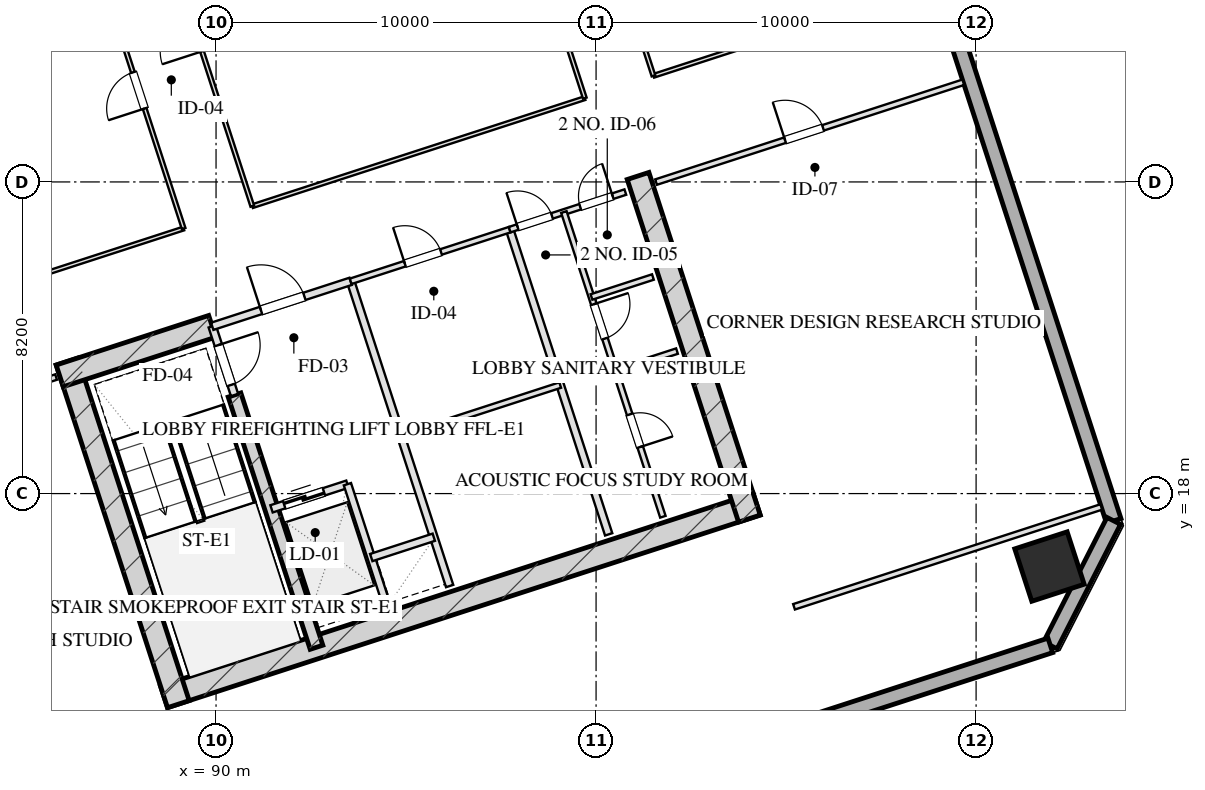
"""IFC4 building model, lengths in metres.
Left out: names, types, materials, properties, quantities, classifications, styles, units other than length and angle.
Written with IfcOpenShell. Run it as: python <this file> out.ifc"""

import sys

from ifc_helpers import new_model, si_unit, direction, frame, frame_2d, origin, origin_2d, place, context, subcontext, project, spatial, rectangle, hollow_rectangle, extrude, element, fill, save


model = new_model("IFC4")
c1 = context("Model", 3, precision=1e-05, world=origin(), true_north=direction((0.0, 1.0)))
c2 = subcontext(c1, "Body", "Model", "MODEL_VIEW")
j1 = project(units=[si_unit("LENGTHUNIT", "METRE"), si_unit("PLANEANGLEUNIT", "RADIAN")], contexts=[c1])
p1 = place(None, origin())
s1 = spatial("IfcSite", under=j1, at=p1, CompositionType="ELEMENT")
p2 = place(p1, origin())
s2 = spatial("IfcBuilding", under=s1, at=p2, CompositionType="ELEMENT")
p3 = place(p2, frame((0.0, 0.0, 127.65)))
s3 = spatial("IfcBuildingStorey", under=s2, at=p3, CompositionType="ELEMENT", Elevation=127.65)
p4 = place(p3, frame((88.63, 12.652, 0.0), z_axis=(0.0, 0.0, 1.0), x_axis=(0.95105714907, 0.309015046886, 0.0)))
e1 = element("IfcWall", 1, at=p4, inside=s3, PredefinedType="SHEAR", context=c2, shape_type="SweptSolid", body=[
    extrude(rectangle(XDim=16.4, YDim=0.6, at=frame_2d((8.2, 0.0))), origin(), (0.0, 0.0, 1.0), 3.45),
])
p5 = place(p3, frame((86.078, 21.475, 0.0), z_axis=(0.0, 0.0, 1.0), x_axis=(0.309017938678, -0.951056209472, 0.0)))
e2 = element("IfcWall", 2, at=p5, inside=s3, PredefinedType="SHEAR", context=c2, shape_type="SweptSolid", body=[
    extrude(rectangle(XDim=9.48, YDim=0.6, at=frame_2d((4.74, 0.0))), origin(), (0.0, 0.0, 1.0), 3.45),
])
p6 = place(p3, frame((101.105, 26.358, 0.0), z_axis=(0.0, 0.0, 1.0), x_axis=(0.309010370028, -0.95105866865, 0.0)))
e3 = element("IfcWall", 3, at=p6, inside=s3, PredefinedType="SHEAR", context=c2, shape_type="SweptSolid", body=[
    extrude(rectangle(XDim=9.48, YDim=0.6, at=frame_2d((4.74, 0.0))), origin(), (0.0, 0.0, 1.0), 3.45),
])
p7 = place(p3, frame((90.486, 20.594, 0.0), z_axis=(0.0, 0.0, 1.0), x_axis=(0.309020428229, -0.951055400562, 0.0)))
e4 = element("IfcWall", 4, at=p7, inside=s3, PredefinedType="SHEAR", context=c2, shape_type="SweptSolid", body=[
    extrude(rectangle(XDim=6.98, YDim=0.35, at=frame_2d((3.49, 0.0))), origin(), (0.0, 0.0, 1.0), 3.45),
])
p8 = place(p3, frame((85.886, 21.097, 0.0), z_axis=(0.0, 0.0, 1.0), x_axis=(0.951068073652, 0.308981422225, 0.0)))
e5 = element("IfcWall", 5, at=p8, inside=s3, PredefinedType="SHEAR", context=c2, shape_type="SweptSolid", body=[
    extrude(rectangle(XDim=4.22, YDim=0.6, at=frame_2d((2.11, 0.0))), origin(), (0.0, 0.0, 1.0), 3.45),
])
p9 = place(p3, frame((111.931, 16.08, 0.0), z_axis=(0.0, 0.0, 1.0), x_axis=(0.951056516295, 0.309016994375, 0.0)))
e6 = element("IfcColumn", 6, at=p9, inside=s3, PredefinedType="COLUMN", context=c2, shape_type="SweptSolid", body=[
    extrude(hollow_rectangle(XDim=1.45, YDim=1.45, WallThickness=0.05, at=origin_2d()), origin(), (0.0, 0.0, 1.0), 3.451),
])
p10 = place(p3, frame((99.284, 61.41, 0.0), z_axis=(0.0, 0.0, 1.0), x_axis=(0.309017542002, -0.95105633836, 0.0)))
e7 = element("IfcWall", 7, at=p10, inside=s3, PredefinedType="SOLIDWALL", context=c2, shape_type="SweptSolid", body=[
    extrude(rectangle(XDim=46.4, YDim=0.4, at=frame_2d((23.2, 0.0))), origin(), (0.0, 0.0, 1.0), 2.61),
])
p11 = place(p3, frame((113.623, 17.281, 0.0), z_axis=(0.0, 0.0, 1.0), x_axis=(-0.454026238093, -0.890988313685, 0.0)))
e8 = element("IfcWall", 8, at=p11, inside=s3, PredefinedType="SOLIDWALL", context=c2, shape_type="SweptSolid", body=[
    extrude(rectangle(XDim=3.677, YDim=0.4, at=frame_2d((1.838, 0.0))), origin(), (0.0, 0.0, 1.0), 2.61),
])
p12 = place(p3, frame((111.953, 14.005, 0.0), z_axis=(0.0, 0.0, 1.0), x_axis=(-0.95105505922, -0.309021478754, 0.0)))
e9 = element("IfcWall", 9, at=p12, inside=s3, PredefinedType="SOLIDWALL", context=c2, shape_type="SweptSolid", body=[
    extrude(rectangle(XDim=29.4, YDim=0.4, at=frame_2d((14.7, 0.0))), origin(), (0.0, 0.0, 1.0), 2.61),
])
p13 = place(p3, frame((89.899, 22.401, 0.0), z_axis=(0.0, 0.0, 1.0), x_axis=(0.308932062672, -0.951084108086, 0.0)))
e10 = element("IfcWall", 10, at=p13, inside=s3, PredefinedType="PARTITIONING", context=c2, shape_type="SweptSolid", body=[
    extrude(rectangle(XDim=1.9, YDim=0.2, at=frame_2d((0.95, 0.0))), origin(), (0.0, 0.0, 1.0), 3.175),
])
p14 = place(p13, frame((0.52, 0.0, 0.0)))
e11 = element("IfcOpeningElement", 11, at=p14, cuts=e10, PredefinedType="OPENING", context=c2, shape_type="SweptSolid", body=[
    extrude(rectangle(XDim=1.1, YDim=2.05, at=frame_2d((0.55, 1.025))), frame((0.0, 0.11, 0.0), z_axis=(0.0, -1.0, 0.0), x_axis=(1.0, 0.0, 0.0)), (0.0, 0.0, 1.0), 0.22),
])
p15 = place(p3, frame((93.542, 23.585, 0.0), z_axis=(0.0, 0.0, 1.0), x_axis=(0.309042196757, -0.951048327176, 0.0)))
e12 = element("IfcWall", 12, at=p15, inside=s3, PredefinedType="PARTITIONING", context=c2, shape_type="SweptSolid", body=[
    extrude(rectangle(XDim=8.43, YDim=0.2, at=frame_2d((4.215, 0.0))), origin(), (0.0, 0.0, 1.0), 3.175),
])
p16 = place(p3, frame((89.899, 22.401, 0.0), z_axis=(0.0, 0.0, 1.0), x_axis=(0.951046716504, 0.309047153403, 0.0)))
e13 = element("IfcWall", 13, at=p16, inside=s3, PredefinedType="PARTITIONING", context=c2, shape_type="SweptSolid", body=[
    extrude(rectangle(XDim=3.83, YDim=0.2, at=frame_2d((1.915, 0.0))), origin(), (0.0, 0.0, 1.0), 3.175),
])
p17 = place(p16, frame((1.35, 0.0, 0.0)))
e14 = element("IfcOpeningElement", 14, at=p17, cuts=e13, PredefinedType="OPENING", context=c2, shape_type="SweptSolid", body=[
    extrude(rectangle(XDim=1.2, YDim=2.05, at=frame_2d((0.6, 1.025))), frame((0.0, 0.11, 0.0), z_axis=(0.0, -1.0, 0.0), x_axis=(1.0, 0.0, 0.0)), (0.0, 0.0, 1.0), 0.22),
])
p18 = place(p3, frame((91.46, 17.598, 0.0), z_axis=(0.0, 0.0, 1.0), x_axis=(0.951062257173, 0.308999325213, 0.0)))
e15 = element("IfcWall", 15, at=p18, inside=s3, PredefinedType="PARTITIONING", context=c2, shape_type="SweptSolid", body=[
    extrude(rectangle(XDim=2.1, YDim=0.2, at=frame_2d((1.05, 0.0))), origin(), (0.0, 0.0, 1.0), 3.175),
])
p19 = place(p18, frame((0.35, 0.0, 0.0)))
e16 = element("IfcOpeningElement", 16, at=p19, cuts=e15, PredefinedType="OPENING", context=c2, shape_type="SweptSolid", body=[
    extrude(rectangle(XDim=1.1, YDim=2.05, at=frame_2d((0.55, 1.025))), frame((0.0, 0.11, 0.0), z_axis=(0.0, -1.0, 0.0), x_axis=(1.0, 0.0, 0.0)), (0.0, 0.0, 1.0), 0.22),
])
p20 = place(p3, frame((93.457, 18.247, 0.0), z_axis=(0.0, 0.0, 1.0), x_axis=(0.3089935693, -0.951064127245, 0.0)))
e17 = element("IfcWall", 17, at=p20, inside=s3, PredefinedType="PARTITIONING", context=c2, shape_type="SweptSolid", body=[
    extrude(rectangle(XDim=3.7, YDim=0.2, at=frame_2d((1.85, 0.0))), origin(), (0.0, 0.0, 1.0), 3.175),
])
p21 = place(p3, frame((94.084, 16.317, 0.0), z_axis=(0.0, 0.0, 1.0), x_axis=(0.951041328149, 0.309063734775, 0.0)))
e18 = element("IfcWall", 18, at=p21, inside=s3, PredefinedType="PARTITIONING", context=c2, shape_type="SweptSolid", body=[
    extrude(rectangle(XDim=1.73, YDim=0.2, at=frame_2d((0.865, 0.0))), origin(), (0.0, 0.0, 1.0), 3.175),
])
p22 = place(p3, frame((97.727, 24.944, 0.0), z_axis=(0.0, 0.0, 1.0), x_axis=(0.309016001439, -0.951056838919, 0.0)))
e19 = element("IfcWall", 19, at=p22, inside=s3, PredefinedType="PARTITIONING", context=c2, shape_type="SweptSolid", body=[
    extrude(rectangle(XDim=8.43, YDim=0.2, at=frame_2d((4.215, 0.0))), origin(), (0.0, 0.0, 1.0), 3.175),
])
p23 = place(p3, frame((93.542, 23.585, 0.0), z_axis=(0.0, 0.0, 1.0), x_axis=(0.951063829732, 0.308994485023, 0.0)))
e20 = element("IfcWall", 20, at=p23, inside=s3, PredefinedType="PARTITIONING", context=c2, shape_type="SweptSolid", body=[
    extrude(rectangle(XDim=4.4, YDim=0.15, at=frame_2d((2.2, 0.0))), origin(), (0.0, 0.0, 1.0), 3.175),
])
p24 = place(p23, frame((1.5, 0.0, 0.0)))
e21 = element("IfcOpeningElement", 21, at=p24, cuts=e20, PredefinedType="OPENING", context=c2, shape_type="SweptSolid", body=[
    extrude(rectangle(XDim=1.0, YDim=2.05, at=frame_2d((0.5, 1.025))), frame((0.0, 0.085, 0.0), z_axis=(0.0, -1.0, 0.0), x_axis=(1.0, 0.0, 0.0)), (0.0, 0.0, 1.0), 0.17),
])
p25 = place(p3, frame((94.871, 19.495, 0.0), z_axis=(0.0, 0.0, 1.0), x_axis=(0.951042223598, 0.309060979314, 0.0)))
e22 = element("IfcWall", 22, at=p25, inside=s3, PredefinedType="PARTITIONING", context=c2, shape_type="SweptSolid", body=[
    extrude(rectangle(XDim=4.4, YDim=0.15, at=frame_2d((2.2, 0.0))), origin(), (0.0, 0.0, 1.0), 3.175),
])
p26 = place(p3, frame((97.727, 24.944, 0.0), z_axis=(0.0, 0.0, 1.0), x_axis=(0.951036872128, 0.309077446369, 0.0)))
e23 = element("IfcWall", 23, at=p26, inside=s3, PredefinedType="PARTITIONING", context=c2, shape_type="SweptSolid", body=[
    extrude(rectangle(XDim=3.2, YDim=0.15, at=frame_2d((1.6, 0.0))), origin(), (0.0, 0.0, 1.0), 3.175),
])
p27 = place(p26, frame((0.22, 0.0, 0.0)))
e24 = element("IfcOpeningElement", 24, at=p27, cuts=e23, PredefinedType="OPENING", context=c2, shape_type="SweptSolid", body=[
    extrude(rectangle(XDim=0.95, YDim=2.05, at=frame_2d((0.475, 1.025))), frame((0.0, 0.085, 0.0), z_axis=(0.0, -1.0, 0.0), x_axis=(1.0, 0.0, 0.0)), (0.0, 0.0, 1.0), 0.17),
])
p28 = place(p26, frame((1.95, 0.0, 0.0)))
e25 = element("IfcOpeningElement", 25, at=p28, cuts=e23, PredefinedType="OPENING", context=c2, shape_type="SweptSolid", body=[
    extrude(rectangle(XDim=0.9, YDim=2.05, at=frame_2d((0.45, 1.025))), frame((0.0, 0.085, 0.0), z_axis=(0.0, -1.0, 0.0), x_axis=(1.0, 0.0, 0.0)), (0.0, 0.0, 1.0), 0.17),
])
p29 = place(p3, frame((99.153, 25.408, 0.0), z_axis=(0.0, 0.0, 1.0), x_axis=(0.309016001439, -0.951056838919, 0.0)))
e26 = element("IfcWall", 26, at=p29, inside=s3, PredefinedType="PARTITIONING", context=c2, shape_type="SweptSolid", body=[
    extrude(rectangle(XDim=8.43, YDim=0.15, at=frame_2d((4.215, 0.0))), origin(), (0.0, 0.0, 1.0), 3.175),
])
p30 = place(p29, frame((2.55, 0.0, 0.0)))
e27 = element("IfcOpeningElement", 27, at=p30, cuts=e26, PredefinedType="OPENING", context=c2, shape_type="SweptSolid", body=[
    extrude(rectangle(XDim=0.95, YDim=2.05, at=frame_2d((0.475, 1.025))), frame((0.0, 0.085, 0.0), z_axis=(0.0, -1.0, 0.0), x_axis=(1.0, 0.0, 0.0)), (0.0, 0.0, 1.0), 0.17),
])
p31 = place(p29, frame((5.6, 0.0, 0.0)))
e28 = element("IfcOpeningElement", 28, at=p31, cuts=e26, PredefinedType="OPENING", context=c2, shape_type="SweptSolid", body=[
    extrude(rectangle(XDim=0.9, YDim=2.05, at=frame_2d((0.45, 1.025))), frame((0.0, 0.085, 0.0), z_axis=(0.0, -1.0, 0.0), x_axis=(1.0, 0.0, 0.0)), (0.0, 0.0, 1.0), 0.17),
])
for number, where, z_axis, x_axis in (
    (29, (100.513, 21.223, 0.0), (0.0, 0.0, 1.0), (0.951, 0.309, 0.0)),
    (30, (99.879, 23.173, 0.0), (0.0, 0.0, 1.0), (0.951, 0.309, 0.0)),
):
    element("IfcWall", number, at=place(p3, frame(where, z_axis=z_axis, x_axis=x_axis)), inside=s3, PredefinedType="PARTITIONING", context=c2, shape_type="SweptSolid", body=[
        extrude(rectangle(XDim=1.7, YDim=0.15, at=frame_2d((0.85, 0.0))), origin(), (0.0, 0.0, 1.0), 3.175),
    ])
p32 = place(p3, frame((77.136, 18.254, 0.0), z_axis=(0.0, 0.0, 1.0), x_axis=(0.951057133767, 0.309015093986, 0.0)))
e31 = element("IfcWall", 31, at=p32, inside=s3, PredefinedType="PARTITIONING", context=c2, shape_type="SweptSolid", body=[
    extrude(rectangle(XDim=9.1, YDim=0.15, at=frame_2d((4.55, 0.0))), origin(), (0.0, 0.0, 1.0), 3.175),
])
p33 = place(p32, frame((3.822, 0.0, 0.0)))
e32 = element("IfcOpeningElement", 32, at=p33, cuts=e31, PredefinedType="OPENING", context=c2, shape_type="SweptSolid", body=[
    extrude(rectangle(XDim=1.0, YDim=2.05, at=frame_2d((0.5, 1.025))), frame((0.0, 0.085, 0.0), z_axis=(0.0, -1.0, 0.0), x_axis=(1.0, 0.0, 0.0)), (0.0, 0.0, 1.0), 0.17),
])
p34 = place(p3, frame((105.209, 15.021, 0.0), z_axis=(0.0, 0.0, 1.0), x_axis=(0.951054329824, 0.309023723562, 0.0)))
e33 = element("IfcWall", 33, at=p34, inside=s3, PredefinedType="PARTITIONING", context=c2, shape_type="SweptSolid", body=[
    extrude(rectangle(XDim=8.5, YDim=0.15, at=frame_2d((4.25, 0.0))), origin(), (0.0, 0.0, 1.0), 3.175),
])
p35 = place(p3, frame((101.578, 26.196, 0.0), z_axis=(0.0, 0.0, 1.0), x_axis=(0.951062770994, 0.308997743729, 0.0)))
e34 = element("IfcWall", 34, at=p35, inside=s3, PredefinedType="PARTITIONING", context=c2, shape_type="SweptSolid", body=[
    extrude(rectangle(XDim=8.5, YDim=0.15, at=frame_2d((4.25, 0.0))), origin(), (0.0, 0.0, 1.0), 3.175),
])
p36 = place(p35, frame((3.57, 0.0, 0.0)))
e35 = element("IfcOpeningElement", 35, at=p36, cuts=e34, PredefinedType="OPENING", context=c2, shape_type="SweptSolid", body=[
    extrude(rectangle(XDim=1.05, YDim=2.05, at=frame_2d((0.525, 1.025))), frame((0.0, 0.085, 0.0), z_axis=(0.0, -1.0, 0.0), x_axis=(1.0, 0.0, 0.0)), (0.0, 0.0, 1.0), 0.17),
])
p37 = place(p3, frame((76.308, 20.803, 0.0), z_axis=(0.0, 0.0, 1.0), x_axis=(0.951054001411, 0.309024734286, 0.0)))
e36 = element("IfcWall", 36, at=p37, inside=s3, PredefinedType="MOVABLE", context=c2, shape_type="SweptSolid", body=[
    extrude(rectangle(XDim=13.5, YDim=0.1, at=frame_2d((6.75, 0.0))), origin(), (0.0, 0.0, 1.0), 3.175),
])
p38 = place(p3, frame((90.954, 25.562, 0.0), z_axis=(0.0, 0.0, 1.0), x_axis=(0.951052398814, 0.309029666393, 0.0)))
e37 = element("IfcWall", 37, at=p38, inside=s3, PredefinedType="MOVABLE", context=c2, shape_type="SweptSolid", body=[
    extrude(rectangle(XDim=9.2, YDim=0.1, at=frame_2d((4.6, 0.0))), origin(), (0.0, 0.0, 1.0), 3.175),
])
p39 = place(p3, frame((101.511, 28.992, 0.0), z_axis=(0.0, 0.0, 1.0), x_axis=(0.951056202154, 0.3090179612, 0.0)))
e38 = element("IfcWall", 38, at=p39, inside=s3, PredefinedType="MOVABLE", context=c2, shape_type="SweptSolid", body=[
    extrude(rectangle(XDim=7.7, YDim=0.1, at=frame_2d((3.85, 0.0))), origin(), (0.0, 0.0, 1.0), 3.175),
])
p40 = place(p3, frame((89.147, 24.975, 0.0), z_axis=(0.0, 0.0, 1.0), x_axis=(-0.309022042254, 0.951054876125, 0.0)))
e39 = element("IfcWall", 39, at=p40, inside=s3, PredefinedType="MOVABLE", context=c2, shape_type="SweptSolid", body=[
    extrude(rectangle(XDim=16.64, YDim=0.1, at=frame_2d((8.32, 0.0))), origin(), (0.0, 0.0, 1.0), 3.175),
])
p41 = place(p40, frame((3.32, 0.0, 0.0)))
e40 = element("IfcOpeningElement", 40, at=p41, cuts=e39, PredefinedType="OPENING", context=c2, shape_type="SweptSolid", body=[
    extrude(rectangle(XDim=1.0, YDim=2.05, at=frame_2d((0.5, 1.025))), frame((0.0, 0.06, 0.0), z_axis=(0.0, -1.0, 0.0), x_axis=(1.0, 0.0, 0.0)), (0.0, 0.0, 1.0), 0.12),
])
p42 = place(p40, frame((11.64, 0.0, 0.0)))
e41 = element("IfcOpeningElement", 41, at=p42, cuts=e39, PredefinedType="OPENING", context=c2, shape_type="SweptSolid", body=[
    extrude(rectangle(XDim=1.0, YDim=2.05, at=frame_2d((0.5, 1.025))), frame((0.0, 0.06, 0.0), z_axis=(0.0, -1.0, 0.0), x_axis=(1.0, 0.0, 0.0)), (0.0, 0.0, 1.0), 0.12),
])
p43 = place(p3, frame((90.954, 25.562, 0.0), z_axis=(0.0, 0.0, 1.0), x_axis=(-0.30901773025, 0.951056277195, 0.0)))
e42 = element("IfcWall", 42, at=p43, inside=s3, PredefinedType="MOVABLE", context=c2, shape_type="SweptSolid", body=[
    extrude(rectangle(XDim=16.64, YDim=0.1, at=frame_2d((8.32, 0.0))), origin(), (0.0, 0.0, 1.0), 3.175),
])
p44 = place(p43, frame((4.284, 0.0, 0.0)))
e43 = element("IfcOpeningElement", 43, at=p44, cuts=e42, PredefinedType="OPENING", context=c2, shape_type="SweptSolid", body=[
    extrude(rectangle(XDim=1.1, YDim=2.05, at=frame_2d((0.55, 1.025))), frame((0.0, 0.06, 0.0), z_axis=(0.0, -1.0, 0.0), x_axis=(1.0, 0.0, 0.0)), (0.0, 0.0, 1.0), 0.12),
])
p45 = place(p43, frame((12.724, 0.0, 0.0)))
e44 = element("IfcOpeningElement", 44, at=p45, cuts=e42, PredefinedType="OPENING", context=c2, shape_type="SweptSolid", body=[
    extrude(rectangle(XDim=1.1, YDim=2.05, at=frame_2d((0.55, 1.025))), frame((0.0, 0.06, 0.0), z_axis=(0.0, -1.0, 0.0), x_axis=(1.0, 0.0, 0.0)), (0.0, 0.0, 1.0), 0.12),
])
p46 = place(p3, frame((99.704, 28.405, 0.0), z_axis=(0.0, 0.0, 1.0), x_axis=(-0.309004459387, 0.951060589068, 0.0)))
e45 = element("IfcWall", 45, at=p46, inside=s3, PredefinedType="MOVABLE", context=c2, shape_type="SweptSolid", body=[
    extrude(rectangle(XDim=16.64, YDim=0.1, at=frame_2d((8.32, 0.0))), origin(), (0.0, 0.0, 1.0), 3.175),
])
p47 = place(p3, frame((101.511, 28.992, 0.0), z_axis=(0.0, 0.0, 1.0), x_axis=(-0.30901773025, 0.951056277195, 0.0)))
e46 = element("IfcWall", 46, at=p47, inside=s3, PredefinedType="MOVABLE", context=c2, shape_type="SweptSolid", body=[
    extrude(rectangle(XDim=16.64, YDim=0.1, at=frame_2d((8.32, 0.0))), origin(), (0.0, 0.0, 1.0), 3.175),
])
p48 = place(p47, frame((1.16, 0.0, 0.0)))
e47 = element("IfcOpeningElement", 47, at=p48, cuts=e46, PredefinedType="OPENING", context=c2, shape_type="SweptSolid", body=[
    extrude(rectangle(XDim=1.05, YDim=2.05, at=frame_2d((0.525, 1.025))), frame((0.0, 0.06, 0.0), z_axis=(0.0, -1.0, 0.0), x_axis=(1.0, 0.0, 0.0)), (0.0, 0.0, 1.0), 0.12),
])
p49 = place(p47, frame((6.16, 0.0, 0.0)))
e48 = element("IfcOpeningElement", 48, at=p49, cuts=e46, PredefinedType="OPENING", context=c2, shape_type="SweptSolid", body=[
    extrude(rectangle(XDim=1.0, YDim=2.05, at=frame_2d((0.5, 1.025))), frame((0.0, 0.06, 0.0), z_axis=(0.0, -1.0, 0.0), x_axis=(1.0, 0.0, 0.0)), (0.0, 0.0, 1.0), 0.12),
])
p50 = place(p47, frame((10.16, 0.0, 0.0)))
e49 = element("IfcOpeningElement", 49, at=p50, cuts=e46, PredefinedType="OPENING", context=c2, shape_type="SweptSolid", body=[
    extrude(rectangle(XDim=1.0, YDim=2.05, at=frame_2d((0.5, 1.025))), frame((0.0, 0.06, 0.0), z_axis=(0.0, -1.0, 0.0), x_axis=(1.0, 0.0, 0.0)), (0.0, 0.0, 1.0), 0.12),
])
p51 = place(p47, frame((14.48, 0.0, 0.0)))
e50 = element("IfcOpeningElement", 50, at=p51, cuts=e46, PredefinedType="OPENING", context=c2, shape_type="SweptSolid", body=[
    extrude(rectangle(XDim=1.0, YDim=2.05, at=frame_2d((0.5, 1.025))), frame((0.0, 0.06, 0.0), z_axis=(0.0, -1.0, 0.0), x_axis=(1.0, 0.0, 0.0)), (0.0, 0.0, 1.0), 0.12),
])
p52 = place(p3, frame((73.947, 28.069, 0.0), z_axis=(0.0, 0.0, 1.0), x_axis=(0.951059316265, 0.309008376821, 0.0)))
e51 = element("IfcWall", 51, at=p52, inside=s3, PredefinedType="MOVABLE", context=c2, shape_type="SweptSolid", body=[
    extrude(rectangle(XDim=13.5, YDim=0.1, at=frame_2d((6.75, 0.0))), origin(), (0.0, 0.0, 1.0), 3.175),
])
p53 = place(p14, origin())
e52 = element("IfcDoor", 52, at=p53, inside=s3, OperationType="SINGLE_SWING_LEFT", PredefinedType="DOOR", context=c2, shape_type="SweptSolid", body=[
    extrude(rectangle(XDim=1.1, YDim=2.05, at=frame_2d((0.55, 1.025))), frame((0.0, 0.025, 0.0), z_axis=(0.0, -1.0, 0.0), x_axis=(1.0, 0.0, 0.0)), (0.0, 0.0, 1.0), 0.05),
])
fill(e11, e52)
p54 = place(p17, origin())
e53 = element("IfcDoor", 53, at=p54, inside=s3, OperationType="SINGLE_SWING_LEFT", PredefinedType="DOOR", context=c2, shape_type="SweptSolid", body=[
    extrude(rectangle(XDim=1.2, YDim=2.05, at=frame_2d((0.6, 1.025))), frame((0.0, 0.025, 0.0), z_axis=(0.0, -1.0, 0.0), x_axis=(1.0, 0.0, 0.0)), (0.0, 0.0, 1.0), 0.05),
])
fill(e14, e53)
p55 = place(p19, origin())
e54 = element("IfcDoor", 54, at=p55, inside=s3, OperationType="DOUBLE_DOOR_SLIDING", PredefinedType="DOOR", context=c2, shape_type="SweptSolid", body=[
    extrude(rectangle(XDim=1.1, YDim=2.05, at=frame_2d((0.55, 1.025))), frame((0.0, 0.025, 0.0), z_axis=(0.0, -1.0, 0.0), x_axis=(1.0, 0.0, 0.0)), (0.0, 0.0, 1.0), 0.05),
])
fill(e16, e54)
p56 = place(p24, origin())
e55 = element("IfcDoor", 55, at=p56, inside=s3, OperationType="SINGLE_SWING_LEFT", PredefinedType="DOOR", context=c2, shape_type="SweptSolid", body=[
    extrude(rectangle(XDim=1.0, YDim=2.05, at=frame_2d((0.5, 1.025))), frame((0.0, 0.025, 0.0), z_axis=(0.0, -1.0, 0.0), x_axis=(1.0, 0.0, 0.0)), (0.0, 0.0, 1.0), 0.05),
])
fill(e21, e55)
p57 = place(p27, origin())
e56 = element("IfcDoor", 56, at=p57, inside=s3, OperationType="SINGLE_SWING_LEFT", PredefinedType="DOOR", context=c2, shape_type="SweptSolid", body=[
    extrude(rectangle(XDim=0.95, YDim=2.05, at=frame_2d((0.475, 1.025))), frame((0.0, 0.025, 0.0), z_axis=(0.0, -1.0, 0.0), x_axis=(1.0, 0.0, 0.0)), (0.0, 0.0, 1.0), 0.05),
])
fill(e24, e56)
p58 = place(p28, origin())
e57 = element("IfcDoor", 57, at=p58, inside=s3, OperationType="SINGLE_SWING_RIGHT", PredefinedType="DOOR", context=c2, shape_type="SweptSolid", body=[
    extrude(rectangle(XDim=0.9, YDim=2.05, at=frame_2d((0.45, 1.025))), frame((0.0, 0.025, 0.0), z_axis=(0.0, -1.0, 0.0), x_axis=(1.0, 0.0, 0.0)), (0.0, 0.0, 1.0), 0.05),
])
fill(e25, e57)
p59 = place(p30, origin())
e58 = element("IfcDoor", 58, at=p59, inside=s3, OperationType="SINGLE_SWING_LEFT", PredefinedType="DOOR", context=c2, shape_type="SweptSolid", body=[
    extrude(rectangle(XDim=0.95, YDim=2.05, at=frame_2d((0.475, 1.025))), frame((0.0, 0.025, 0.0), z_axis=(0.0, -1.0, 0.0), x_axis=(1.0, 0.0, 0.0)), (0.0, 0.0, 1.0), 0.05),
])
fill(e27, e58)
p60 = place(p31, origin())
e59 = element("IfcDoor", 59, at=p60, inside=s3, OperationType="SINGLE_SWING_RIGHT", PredefinedType="DOOR", context=c2, shape_type="SweptSolid", body=[
    extrude(rectangle(XDim=0.9, YDim=2.05, at=frame_2d((0.45, 1.025))), frame((0.0, 0.025, 0.0), z_axis=(0.0, -1.0, 0.0), x_axis=(1.0, 0.0, 0.0)), (0.0, 0.0, 1.0), 0.05),
])
fill(e28, e59)
p61 = place(p36, origin())
e60 = element("IfcDoor", 60, at=p61, inside=s3, OperationType="SINGLE_SWING_LEFT", PredefinedType="DOOR", context=c2, shape_type="SweptSolid", body=[
    extrude(rectangle(XDim=1.05, YDim=2.05, at=frame_2d((0.525, 1.025))), frame((0.0, 0.025, 0.0), z_axis=(0.0, -1.0, 0.0), x_axis=(1.0, 0.0, 0.0)), (0.0, 0.0, 1.0), 0.05),
])
fill(e35, e60)
p62 = place(p41, origin())
e61 = element("IfcDoor", 61, at=p62, inside=s3, OperationType="SINGLE_SWING_LEFT", PredefinedType="DOOR", context=c2, shape_type="SweptSolid", body=[
    extrude(rectangle(XDim=1.0, YDim=2.05, at=frame_2d((0.5, 1.025))), frame((0.0, 0.025, 0.0), z_axis=(0.0, -1.0, 0.0), x_axis=(1.0, 0.0, 0.0)), (0.0, 0.0, 1.0), 0.05),
])
fill(e40, e61)
save(model, sys.argv[1])
